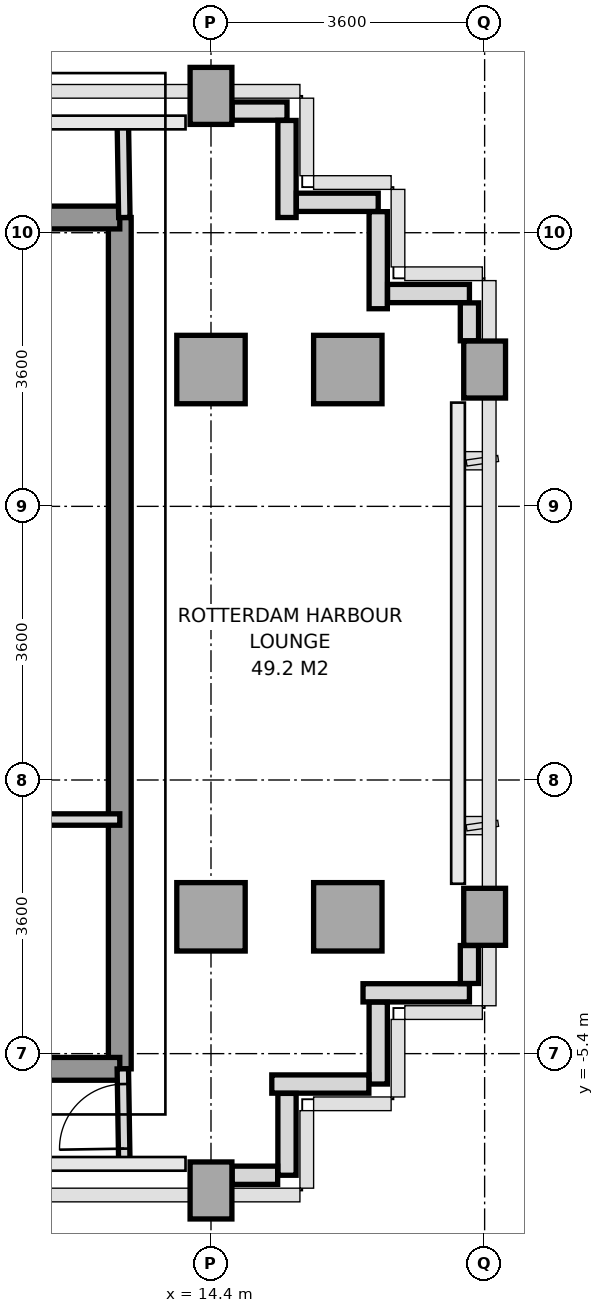
"""IFC4 building model, lengths in metres.
Left out: names, types, materials, properties, quantities, classifications, styles, units other than length and angle.
Written with IfcOpenShell. Run it as: python <this file> out.ifc"""

import sys

from ifc_helpers import new_model, si_unit, direction, frame, frame_2d, origin, origin_2d, place, context, subcontext, project, spatial, rectangle, extrude, source, transform, mapped, element, fill, save


model = new_model("IFC4")
c1 = context("Model", 3, precision=1e-05, world=origin(), true_north=direction((0.0, 1.0)))
c2 = subcontext(c1, "Body", "Model", "MODEL_VIEW")
j1 = project(units=[si_unit("LENGTHUNIT", "METRE"), si_unit("PLANEANGLEUNIT", "RADIAN")], contexts=[c1])
p1 = place(None, origin())
s1 = spatial("IfcSite", under=j1, at=p1, CompositionType="ELEMENT")
p2 = place(p1, origin())
s2 = spatial("IfcBuilding", under=s1, at=p2, CompositionType="ELEMENT")
p3 = place(p2, frame((0.0, 0.0, 219.4)))
s3 = spatial("IfcBuildingStorey", under=s2, at=p3, CompositionType="ELEMENT", Elevation=219.4)
m1 = source(origin(), c2, "Body", "SweptSolid", [
    extrude(rectangle(XDim=0.55, YDim=0.75, at=origin_2d()), origin(), (0.0, 0.0, 1.0), 4.01),
])
p4 = place(p3, frame((14.4, -7.2, 0.0), z_axis=(0.0, 0.0, 1.0), x_axis=(1.0, 0.0, 0.0)))
e1 = element("IfcColumn", 1, at=p4, inside=s3, PredefinedType="COLUMN", context=c2, shape_type="MappedRepresentation", body=[
    mapped(m1, transform((0.0, 0.0, 0.0), x_axis=(1.0, 0.0, 0.0), y_axis=(0.0, 1.0, 0.0), z_axis=(0.0, 0.0, 1.0), scale=1.0)),
])
m2 = source(origin(), c2, "Body", "SweptSolid", [
    extrude(rectangle(XDim=0.9, YDim=0.9, at=origin_2d()), origin(), (0.0, 0.0, 1.0), 4.01),
])
for number, where, z_axis, x_axis in (
    (2, (14.4, -3.6, 0.0), (0.0, 0.0, 1.0), (1.0, 0.0, 0.0)),
    (3, (14.4, 3.6, 0.0), (0.0, 0.0, 1.0), (1.0, 0.0, 0.0)),
):
    element("IfcColumn", number, at=place(p3, frame(where, z_axis=z_axis, x_axis=x_axis)), inside=s3, PredefinedType="COLUMN", context=c2, shape_type="MappedRepresentation", body=[
        mapped(m2, transform((0.0, 0.0, 0.0), x_axis=(1.0, 0.0, 0.0), y_axis=(0.0, 1.0, 0.0), z_axis=(0.0, 0.0, 1.0), scale=1.0)),
    ])
p5 = place(p3, frame((14.4, 7.2, 0.0), z_axis=(0.0, 0.0, 1.0), x_axis=(1.0, 0.0, 0.0)))
e4 = element("IfcColumn", 4, at=p5, inside=s3, PredefinedType="COLUMN", context=c2, shape_type="MappedRepresentation", body=[
    mapped(m1, transform((0.0, 0.0, 0.0), x_axis=(1.0, 0.0, 0.0), y_axis=(0.0, 1.0, 0.0), z_axis=(0.0, 0.0, 1.0), scale=1.0)),
])
for number, where, z_axis, x_axis in (
    (5, (16.2, -3.6, 0.0), (0.0, 0.0, 1.0), (1.0, 0.0, 0.0)),
    (6, (16.2, 3.6, 0.0), (0.0, 0.0, 1.0), (1.0, 0.0, 0.0)),
):
    element("IfcColumn", number, at=place(p3, frame(where, z_axis=z_axis, x_axis=x_axis)), inside=s3, PredefinedType="COLUMN", context=c2, shape_type="MappedRepresentation", body=[
        mapped(m2, transform((0.0, 0.0, 0.0), x_axis=(1.0, 0.0, 0.0), y_axis=(0.0, 1.0, 0.0), z_axis=(0.0, 0.0, 1.0), scale=1.0)),
    ])
for number, where, z_axis, x_axis in (
    (7, (18.0, -3.6, 0.0), (0.0, 0.0, 1.0), (1.0, 0.0, 0.0)),
    (8, (18.0, 3.6, 0.0), (0.0, 0.0, 1.0), (1.0, 0.0, 0.0)),
):
    element("IfcColumn", number, at=place(p3, frame(where, z_axis=z_axis, x_axis=x_axis)), inside=s3, PredefinedType="COLUMN", context=c2, shape_type="MappedRepresentation", body=[
        mapped(m1, transform((0.0, 0.0, 0.0), x_axis=(1.0, 0.0, 0.0), y_axis=(0.0, 1.0, 0.0), z_axis=(0.0, 0.0, 1.0), scale=1.0)),
    ])
p6 = place(p3, frame((17.8, -4.6, 0.0), z_axis=(0.0, 0.0, 1.0), x_axis=(-1.0, 0.0, 0.0)))
e9 = element("IfcWall", 9, at=p6, inside=s3, PredefinedType="PARAPET", context=c2, shape_type="SweptSolid", body=[
    extrude(rectangle(XDim=1.4, YDim=0.24, at=frame_2d((0.7, 0.0))), origin(), (0.0, 0.0, 1.0), 1.15),
])
p7 = place(p3, frame((16.6, -4.723, 0.0), z_axis=(0.0, 0.0, 1.0), x_axis=(0.0, -1.0, 0.0)))
e10 = element("IfcWall", 10, at=p7, inside=s3, PredefinedType="PARAPET", context=c2, shape_type="SweptSolid", body=[
    extrude(rectangle(XDim=1.077, YDim=0.24, at=frame_2d((0.539, 0.0))), origin(), (0.0, 0.0, 1.0), 1.15),
])
p8 = place(p3, frame((16.477, -5.8, 0.0), z_axis=(0.0, 0.0, 1.0), x_axis=(-1.0, 0.0, 0.0)))
e11 = element("IfcWall", 11, at=p8, inside=s3, PredefinedType="PARAPET", context=c2, shape_type="SweptSolid", body=[
    extrude(rectangle(XDim=1.277, YDim=0.24, at=frame_2d((0.639, 0.0))), origin(), (0.0, 0.0, 1.0), 1.15),
])
p9 = place(p3, frame((15.4, -5.923, 0.0), z_axis=(0.0, 0.0, 1.0), x_axis=(0.0, -1.0, 0.0)))
e12 = element("IfcWall", 12, at=p9, inside=s3, PredefinedType="PARAPET", context=c2, shape_type="SweptSolid", body=[
    extrude(rectangle(XDim=1.077, YDim=0.24, at=frame_2d((0.539, 0.0))), origin(), (0.0, 0.0, 1.0), 1.15),
])
p10 = place(p3, frame((15.277, -7.0, 0.0), z_axis=(0.0, 0.0, 1.0), x_axis=(-1.0, 0.0, 0.0)))
e13 = element("IfcWall", 13, at=p10, inside=s3, PredefinedType="PARAPET", context=c2, shape_type="SweptSolid", body=[
    extrude(rectangle(XDim=0.599, YDim=0.24, at=frame_2d((0.3, 0.0))), origin(), (0.0, 0.0, 1.0), 1.15),
])
p11 = place(p3, frame((14.678, 7.0, 0.0), z_axis=(0.0, 0.0, 1.0), x_axis=(1.0, 0.0, 0.0)))
e14 = element("IfcWall", 14, at=p11, inside=s3, PredefinedType="PARAPET", context=c2, shape_type="SweptSolid", body=[
    extrude(rectangle(XDim=0.722, YDim=0.24, at=frame_2d((0.361, 0.0))), origin(), (0.0, 0.0, 1.0), 1.15),
])
p12 = place(p3, frame((15.4, 6.877, 0.0), z_axis=(0.0, 0.0, 1.0), x_axis=(0.0, -1.0, 0.0)))
e15 = element("IfcWall", 15, at=p12, inside=s3, PredefinedType="PARAPET", context=c2, shape_type="SweptSolid", body=[
    extrude(rectangle(XDim=1.277, YDim=0.24, at=frame_2d((0.638, 0.0))), origin(), (0.0, 0.0, 1.0), 1.15),
])
p13 = place(p3, frame((15.523, 5.8, 0.0), z_axis=(0.0, 0.0, 1.0), x_axis=(1.0, 0.0, 0.0)))
e16 = element("IfcWall", 16, at=p13, inside=s3, PredefinedType="PARAPET", context=c2, shape_type="SweptSolid", body=[
    extrude(rectangle(XDim=1.077, YDim=0.24, at=frame_2d((0.539, 0.0))), origin(), (0.0, 0.0, 1.0), 1.15),
])
p14 = place(p3, frame((16.6, 5.677, 0.0), z_axis=(0.0, 0.0, 1.0), x_axis=(0.0, -1.0, 0.0)))
e17 = element("IfcWall", 17, at=p14, inside=s3, PredefinedType="PARAPET", context=c2, shape_type="SweptSolid", body=[
    extrude(rectangle(XDim=1.277, YDim=0.24, at=frame_2d((0.639, 0.0))), origin(), (0.0, 0.0, 1.0), 1.15),
])
p15 = place(p3, frame((16.723, 4.6, 0.0), z_axis=(0.0, 0.0, 1.0), x_axis=(1.0, 0.0, 0.0)))
e18 = element("IfcWall", 18, at=p15, inside=s3, PredefinedType="PARAPET", context=c2, shape_type="SweptSolid", body=[
    extrude(rectangle(XDim=1.077, YDim=0.24, at=frame_2d((0.539, 0.0))), origin(), (0.0, 0.0, 1.0), 1.15),
])
for number, where, z_axis, x_axis in (
    (19, (17.8, 4.477, 0.0), (0.0, 0.0, 1.0), (0.0, -1.0, 0.0)),
    (20, (17.8, -3.978, 0.0), (0.0, 0.0, 1.0), (0.0, -1.0, 0.0)),
):
    element("IfcWall", number, at=place(p3, frame(where, z_axis=z_axis, x_axis=x_axis)), inside=s3, PredefinedType="PARAPET", context=c2, shape_type="SweptSolid", body=[
        extrude(rectangle(XDim=0.499, YDim=0.24, at=frame_2d((0.25, 0.0))), origin(), (0.0, 0.0, 1.0), 1.15),
    ])
p16 = place(p3, frame((13.2, -5.6, 0.0), z_axis=(0.0, 0.0, 1.0), x_axis=(0.0, 1.0, 0.0)))
e21 = element("IfcWall", 21, at=p16, inside=s3, PredefinedType="SHEAR", context=c2, shape_type="SweptSolid", body=[
    extrude(rectangle(XDim=11.2, YDim=0.3, at=frame_2d((5.6, 0.0))), origin(), (0.0, 0.0, 1.0), 4.01),
])
p17 = place(p3, frame((11.356, 5.6, 0.0), z_axis=(0.0, 0.0, 1.0), x_axis=(1.0, 0.0, 0.0)))
e22 = element("IfcWall", 22, at=p17, inside=s3, PredefinedType="SHEAR", context=c2, shape_type="SweptSolid", body=[
    extrude(rectangle(XDim=1.844, YDim=0.3, at=frame_2d((0.922, 0.0))), origin(), (0.0, 0.0, 1.0), 4.01),
])
p18 = place(p3, frame((5.4, -5.6, 0.0), z_axis=(0.0, 0.0, 1.0), x_axis=(1.0, 0.0, 0.0)))
e23 = element("IfcWall", 23, at=p18, inside=s3, PredefinedType="SHEAR", context=c2, shape_type="SweptSolid", body=[
    extrude(rectangle(XDim=7.8, YDim=0.3, at=frame_2d((3.9, 0.0))), origin(), (0.0, 0.0, 1.0), 4.01),
])
p19 = place(p18, frame((5.85, 0.0, 0.0)))
e24 = element("IfcOpeningElement", 24, at=p19, cuts=e23, PredefinedType="OPENING", context=c2, shape_type="SweptSolid", body=[
    extrude(rectangle(XDim=0.8, YDim=2.1, at=frame_2d((0.4, 1.05))), frame((0.0, 0.16, 0.0), z_axis=(0.0, -1.0, 0.0), x_axis=(1.0, 0.0, 0.0)), (0.0, 0.0, 1.0), 0.32),
])
p20 = place(p18, frame((2.65, 0.0, 0.0)))
e25 = element("IfcOpeningElement", 25, at=p20, cuts=e23, PredefinedType="OPENING", context=c2, shape_type="SweptSolid", body=[
    extrude(rectangle(XDim=0.95, YDim=2.15, at=frame_2d((0.475, 1.075))), frame((0.0, 0.16, 0.0), z_axis=(0.0, -1.0, 0.0), x_axis=(1.0, 0.0, 0.0)), (0.0, 0.0, 1.0), 0.32),
])
p21 = place(p3, frame((11.02, -2.32, 0.0), z_axis=(0.0, 0.0, 1.0), x_axis=(1.0, 0.0, 0.0)))
e26 = element("IfcWall", 26, at=p21, inside=s3, PredefinedType="PARTITIONING", context=c2, shape_type="SweptSolid", body=[
    extrude(rectangle(XDim=2.18, YDim=0.15, at=frame_2d((1.09, 0.0))), origin(), (0.0, 0.0, 1.0), 4.01),
])
p22 = place(p3, frame((13.26, 5.6, 0.0), z_axis=(0.0, 0.0, 1.0), x_axis=(-0.016013571389, 0.999871774545, 0.0)))
e27 = element("IfcWall", 27, at=p22, inside=s3, PredefinedType="PARTITIONING", context=c2, shape_type="SweptSolid", body=[
    extrude(rectangle(XDim=1.25, YDim=0.15, at=frame_2d((0.625, 0.0))), origin(), (0.0, 0.0, 1.0), 4.01),
])
p23 = place(p3, frame((13.26, -6.85, 0.0), z_axis=(0.0, 0.0, 1.0), x_axis=(-0.016013571389, 0.999871774545, 0.0)))
e28 = element("IfcWall", 28, at=p23, inside=s3, PredefinedType="PARTITIONING", context=c2, shape_type="SweptSolid", body=[
    extrude(rectangle(XDim=1.25, YDim=0.15, at=frame_2d((0.625, 0.0))), origin(), (0.0, 0.0, 1.0), 4.01),
])
p24 = place(p23, frame((0.2, 0.0, 0.0)))
e29 = element("IfcOpeningElement", 29, at=p24, cuts=e28, PredefinedType="OPENING", context=c2, shape_type="SweptSolid", body=[
    extrude(rectangle(XDim=0.85, YDim=2.1, at=frame_2d((0.425, 1.05))), frame((0.0, 0.085, 0.0), z_axis=(0.0, -1.0, 0.0), x_axis=(1.0, 0.0, 0.0)), (0.0, 0.0, 1.0), 0.17),
])
m3 = source(origin(), c2, "Body", "SweptSolid", [
    extrude(rectangle(XDim=0.85, YDim=2.1, at=frame_2d((0.425, 1.05))), frame((0.0, 0.025, 0.0), z_axis=(0.0, -1.0, 0.0), x_axis=(1.0, 0.0, 0.0)), (0.0, 0.0, 1.0), 0.05),
])
p25 = place(p24, origin())
e30 = element("IfcDoor", 30, at=p25, inside=s3, OperationType="SINGLE_SWING_LEFT", PredefinedType="DOOR", context=c2, shape_type="MappedRepresentation", body=[
    mapped(m3, transform((0.0, 0.0, 0.0), x_axis=(1.0, 0.0, 0.0), y_axis=(0.0, 1.0, 0.0), z_axis=(0.0, 0.0, 1.0), scale=1.0)),
])
fill(e29, e30)
save(model, sys.argv[1])
